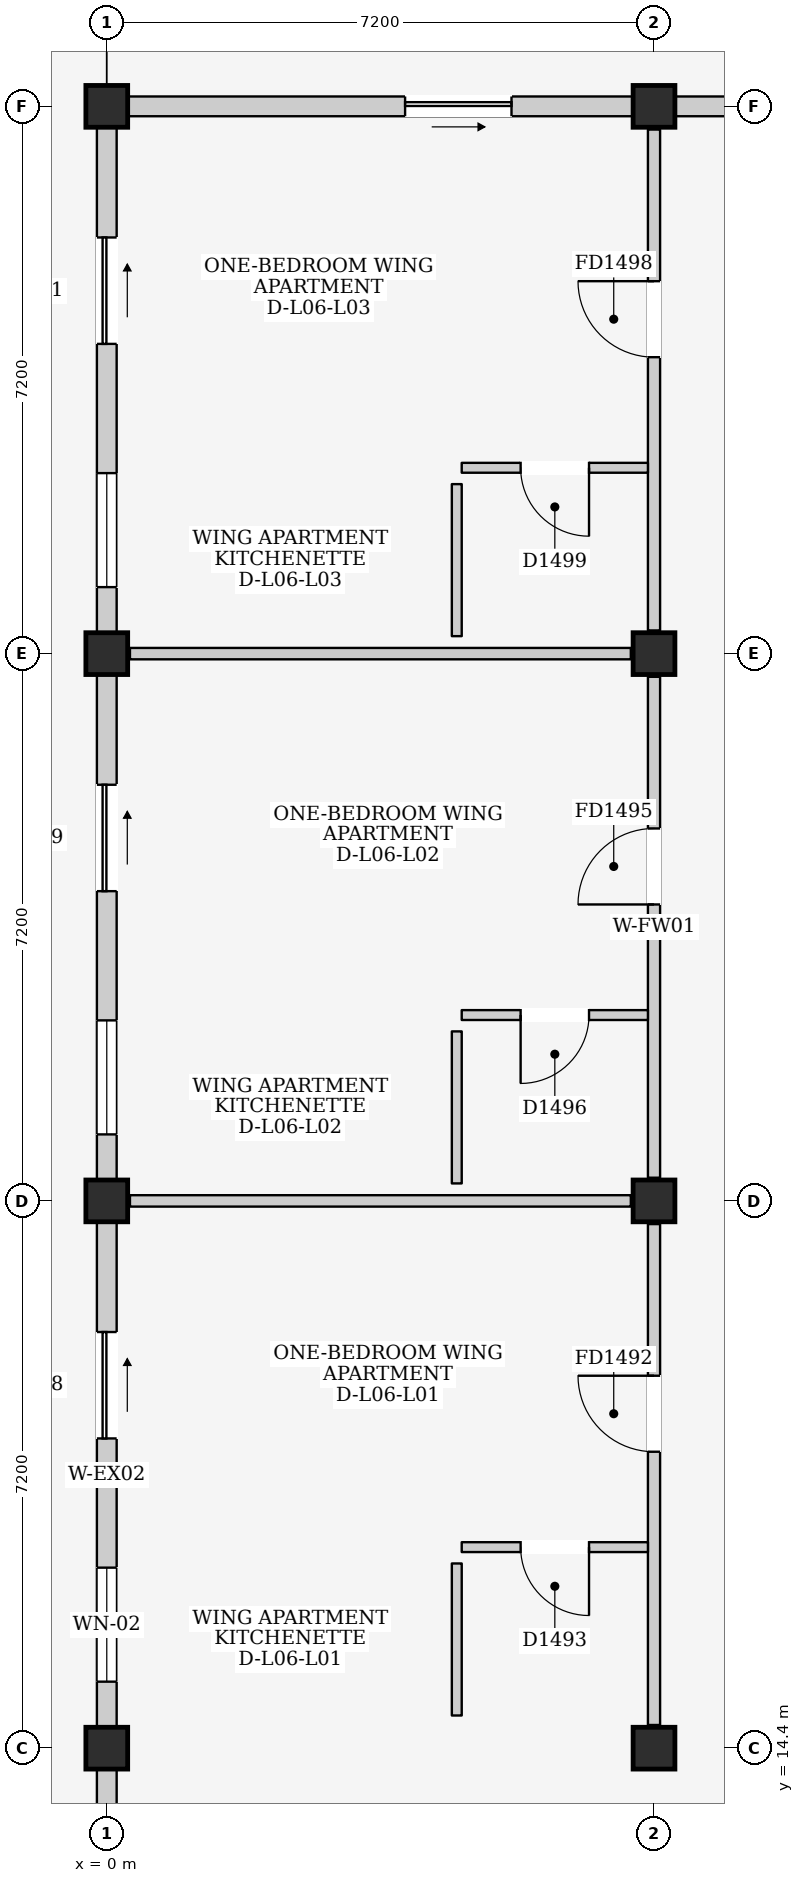
"""IFC4 building model, lengths in metres.
Left out: names, types, materials, properties, quantities, classifications, styles, units other than length and angle.
Written with IfcOpenShell. Run it as: python <this file> out.ifc"""

import sys

from ifc_helpers import new_model, si_unit, direction, frame, frame_2d, origin, origin_2d, place, context, subcontext, project, spatial, rectangle, extrude, element, fill, save


model = new_model("IFC4")
c1 = context("Model", 3, precision=1e-05, world=origin(), true_north=direction((0.0, 1.0)))
c2 = subcontext(c1, "Body", "Model", "MODEL_VIEW")
j1 = project(units=[si_unit("LENGTHUNIT", "METRE"), si_unit("PLANEANGLEUNIT", "RADIAN")], contexts=[c1])
p1 = place(None, origin())
s1 = spatial("IfcSite", under=j1, at=p1, CompositionType="ELEMENT")
p2 = place(p1, origin())
s2 = spatial("IfcBuilding", under=s1, at=p2, CompositionType="ELEMENT")
p3 = place(p2, frame((0.0, 0.0, 21.9)))
s3 = spatial("IfcBuildingStorey", under=s2, at=p3, CompositionType="ELEMENT", Elevation=21.9)
for number, where, z_axis, x_axis in (
    (1, (0.0, 14.4, 0.0), (0.0, 0.0, 1.0), (1.0, 0.0, 0.0)),
    (2, (0.0, 21.6, 0.0), (0.0, 0.0, 1.0), (1.0, 0.0, 0.0)),
    (3, (0.0, 28.8, 0.0), (0.0, 0.0, 1.0), (1.0, 0.0, 0.0)),
    (4, (0.0, 36.0, 0.0), (0.0, 0.0, 1.0), (1.0, 0.0, 0.0)),
    (5, (7.2, 14.4, 0.0), (0.0, 0.0, 1.0), (1.0, 0.0, 0.0)),
    (6, (7.2, 21.6, 0.0), (0.0, 0.0, 1.0), (1.0, 0.0, 0.0)),
    (7, (7.2, 28.8, 0.0), (0.0, 0.0, 1.0), (1.0, 0.0, 0.0)),
    (8, (7.2, 36.0, 0.0), (0.0, 0.0, 1.0), (1.0, 0.0, 0.0)),
):
    element("IfcColumn", number, at=place(p3, frame(where, z_axis=z_axis, x_axis=x_axis)), inside=s3, PredefinedType="COLUMN", context=c2, shape_type="SweptSolid", body=[
        extrude(rectangle(XDim=0.55, YDim=0.55, at=origin_2d()), origin(), (0.0, 0.0, 1.0), 3.2),
    ])
p4 = place(p3, frame((0.0, 7.475, 0.0), z_axis=(0.0, 0.0, 1.0), x_axis=(0.0, 1.0, 0.0)))
e9 = element("IfcWall", 9, at=p4, inside=s3, PredefinedType="ELEMENTEDWALL", context=c2, shape_type="SweptSolid", body=[
    extrude(rectangle(XDim=6.65, YDim=0.26, at=frame_2d((3.325, 0.0))), origin(), (0.0, 0.0, 1.0), 2.515),
])
p5 = place(p4, frame((3.65, 0.0, 0.0)))
e10 = element("IfcOpeningElement", 10, at=p5, cuts=e9, PredefinedType="OPENING", context=c2, shape_type="SweptSolid", body=[
    extrude(rectangle(XDim=1.4, YDim=2.1, at=frame_2d((0.7, 1.05))), frame((0.0, 0.145, 0.0), z_axis=(0.0, -1.0, 0.0), x_axis=(1.0, 0.0, 0.0)), (0.0, 0.0, 1.0), 0.29),
])
p6 = place(p3, frame((0.0, 14.675, 0.0), z_axis=(0.0, 0.0, 1.0), x_axis=(0.0, 1.0, 0.0)))
e11 = element("IfcWall", 11, at=p6, inside=s3, PredefinedType="ELEMENTEDWALL", context=c2, shape_type="SweptSolid", body=[
    extrude(rectangle(XDim=6.65, YDim=0.26, at=frame_2d((3.325, 0.0))), origin(), (0.0, 0.0, 1.0), 2.515),
])
p7 = place(p6, frame((3.8, 0.0, 0.0)))
e12 = element("IfcOpeningElement", 12, at=p7, cuts=e11, PredefinedType="OPENING", context=c2, shape_type="SweptSolid", body=[
    extrude(rectangle(XDim=1.4, YDim=2.1, at=frame_2d((0.7, 1.05))), frame((0.0, 0.145, 0.0), z_axis=(0.0, -1.0, 0.0), x_axis=(1.0, 0.0, 0.0)), (0.0, 0.0, 1.0), 0.29),
])
p8 = place(p6, frame((0.6, 0.0, 0.905)))
e13 = element("IfcOpeningElement", 13, at=p8, cuts=e11, PredefinedType="OPENING", context=c2, shape_type="SweptSolid", body=[
    extrude(rectangle(XDim=1.5, YDim=1.5, at=frame_2d((0.75, 0.75))), frame((0.0, 0.145, 0.0), z_axis=(0.0, -1.0, 0.0), x_axis=(1.0, 0.0, 0.0)), (0.0, 0.0, 1.0), 0.29),
])
p9 = place(p3, frame((0.0, 21.875, 0.0), z_axis=(0.0, 0.0, 1.0), x_axis=(0.0, 1.0, 0.0)))
e14 = element("IfcWall", 14, at=p9, inside=s3, PredefinedType="ELEMENTEDWALL", context=c2, shape_type="SweptSolid", body=[
    extrude(rectangle(XDim=6.65, YDim=0.26, at=frame_2d((3.325, 0.0))), origin(), (0.0, 0.0, 1.0), 2.515),
])
p10 = place(p9, frame((3.8, 0.0, 0.0)))
e15 = element("IfcOpeningElement", 15, at=p10, cuts=e14, PredefinedType="OPENING", context=c2, shape_type="SweptSolid", body=[
    extrude(rectangle(XDim=1.4, YDim=2.1, at=frame_2d((0.7, 1.05))), frame((0.0, 0.145, 0.0), z_axis=(0.0, -1.0, 0.0), x_axis=(1.0, 0.0, 0.0)), (0.0, 0.0, 1.0), 0.29),
])
p11 = place(p9, frame((0.6, 0.0, 0.905)))
e16 = element("IfcOpeningElement", 16, at=p11, cuts=e14, PredefinedType="OPENING", context=c2, shape_type="SweptSolid", body=[
    extrude(rectangle(XDim=1.5, YDim=1.5, at=frame_2d((0.75, 0.75))), frame((0.0, 0.145, 0.0), z_axis=(0.0, -1.0, 0.0), x_axis=(1.0, 0.0, 0.0)), (0.0, 0.0, 1.0), 0.29),
])
p12 = place(p3, frame((0.275, 36.0, 0.0), z_axis=(0.0, 0.0, 1.0), x_axis=(1.0, 0.0, 0.0)))
e17 = element("IfcWall", 17, at=p12, inside=s3, PredefinedType="ELEMENTEDWALL", context=c2, shape_type="SweptSolid", body=[
    extrude(rectangle(XDim=6.65, YDim=0.26, at=frame_2d((3.325, 0.0))), origin(), (0.0, 0.0, 1.0), 2.365),
])
p13 = place(p12, frame((3.65, 0.0, 0.0)))
e18 = element("IfcOpeningElement", 18, at=p13, cuts=e17, PredefinedType="OPENING", context=c2, shape_type="SweptSolid", body=[
    extrude(rectangle(XDim=1.4, YDim=2.1, at=frame_2d((0.7, 1.05))), frame((0.0, 0.145, 0.0), z_axis=(0.0, -1.0, 0.0), x_axis=(1.0, 0.0, 0.0)), (0.0, 0.0, 1.0), 0.29),
])
p14 = place(p3, frame((0.0, 29.075, 0.0), z_axis=(0.0, 0.0, 1.0), x_axis=(0.0, 1.0, 0.0)))
e19 = element("IfcWall", 19, at=p14, inside=s3, PredefinedType="ELEMENTEDWALL", context=c2, shape_type="SweptSolid", body=[
    extrude(rectangle(XDim=6.65, YDim=0.26, at=frame_2d((3.325, 0.0))), origin(), (0.0, 0.0, 1.0), 2.515),
])
p15 = place(p14, frame((3.8, 0.0, 0.0)))
e20 = element("IfcOpeningElement", 20, at=p15, cuts=e19, PredefinedType="OPENING", context=c2, shape_type="SweptSolid", body=[
    extrude(rectangle(XDim=1.4, YDim=2.1, at=frame_2d((0.7, 1.05))), frame((0.0, 0.145, 0.0), z_axis=(0.0, -1.0, 0.0), x_axis=(1.0, 0.0, 0.0)), (0.0, 0.0, 1.0), 0.29),
])
p16 = place(p14, frame((0.6, 0.0, 0.905)))
e21 = element("IfcOpeningElement", 21, at=p16, cuts=e19, PredefinedType="OPENING", context=c2, shape_type="SweptSolid", body=[
    extrude(rectangle(XDim=1.5, YDim=1.5, at=frame_2d((0.75, 0.75))), frame((0.0, 0.145, 0.0), z_axis=(0.0, -1.0, 0.0), x_axis=(1.0, 0.0, 0.0)), (0.0, 0.0, 1.0), 0.29),
])
p17 = place(p3, frame((7.475, 36.0, 0.0), z_axis=(0.0, 0.0, 1.0), x_axis=(1.0, 0.0, 0.0)))
e22 = element("IfcWall", 22, at=p17, inside=s3, PredefinedType="ELEMENTEDWALL", context=c2, shape_type="SweptSolid", body=[
    extrude(rectangle(XDim=6.65, YDim=0.26, at=frame_2d((3.325, 0.0))), origin(), (0.0, 0.0, 1.0), 2.365),
])
p18 = place(p17, frame((2.825, 0.0, 1.1)))
e23 = element("IfcOpeningElement", 23, at=p18, cuts=e22, PredefinedType="OPENING", context=c2, shape_type="SweptSolid", body=[
    extrude(rectangle(XDim=1.0, YDim=0.9, at=frame_2d((0.5, 0.45))), frame((0.0, 0.145, 0.0), z_axis=(0.0, -1.0, 0.0), x_axis=(1.0, 0.0, 0.0)), (0.0, 0.0, 1.0), 0.29),
])
p19 = place(p3, frame((7.2, 14.705, 0.0), z_axis=(0.0, 0.0, 1.0), x_axis=(0.0, 1.0, 0.0)))
e24 = element("IfcWall", 24, at=p19, inside=s3, PredefinedType="PARTITIONING", context=c2, shape_type="SweptSolid", body=[
    extrude(rectangle(XDim=6.59, YDim=0.16, at=frame_2d((3.295, 0.0))), origin(), (0.0, 0.0, 1.0), 2.465),
])
p20 = place(p19, frame((3.595, 0.0, 0.0)))
e25 = element("IfcOpeningElement", 25, at=p20, cuts=e24, PredefinedType="OPENING", context=c2, shape_type="SweptSolid", body=[
    extrude(rectangle(XDim=1.0, YDim=2.15, at=frame_2d((0.5, 1.075))), frame((0.0, 0.095, 0.0), z_axis=(0.0, -1.0, 0.0), x_axis=(1.0, 0.0, 0.0)), (0.0, 0.0, 1.0), 0.19),
])
p21 = place(p3, frame((0.305, 21.6, 0.0), z_axis=(0.0, 0.0, 1.0), x_axis=(1.0, 0.0, 0.0)))
e26 = element("IfcWall", 26, at=p21, inside=s3, PredefinedType="PARTITIONING", context=c2, shape_type="SweptSolid", body=[
    extrude(rectangle(XDim=6.59, YDim=0.15, at=frame_2d((3.295, 0.0))), origin(), (0.0, 0.0, 1.0), 2.365),
])
p22 = place(p3, frame((4.67, 17.045, 0.0), z_axis=(0.0, 0.0, 1.0), x_axis=(1.0, 0.0, 0.0)))
e27 = element("IfcWall", 27, at=p22, inside=s3, PredefinedType="PARTITIONING", context=c2, shape_type="SweptSolid", body=[
    extrude(rectangle(XDim=2.45, YDim=0.13, at=frame_2d((1.225, 0.0))), origin(), (0.0, 0.0, 1.0), 2.98),
])
p23 = place(p22, frame((0.775, 0.0, 0.0)))
e28 = element("IfcOpeningElement", 28, at=p23, cuts=e27, PredefinedType="OPENING", context=c2, shape_type="SweptSolid", body=[
    extrude(rectangle(XDim=0.9, YDim=2.1, at=frame_2d((0.45, 1.05))), frame((0.0, 0.08, 0.0), z_axis=(0.0, -1.0, 0.0), x_axis=(1.0, 0.0, 0.0)), (0.0, 0.0, 1.0), 0.16),
])
p24 = place(p3, frame((4.605, 14.83, 0.0), z_axis=(0.0, 0.0, 1.0), x_axis=(0.0, 1.0, 0.0)))
e29 = element("IfcWall", 29, at=p24, inside=s3, PredefinedType="PARTITIONING", context=c2, shape_type="SweptSolid", body=[
    extrude(rectangle(XDim=2.0, YDim=0.13, at=frame_2d((1.0, 0.0))), origin(), (0.0, 0.0, 1.0), 2.98),
])
p25 = place(p3, frame((7.2, 21.905, 0.0), z_axis=(0.0, 0.0, 1.0), x_axis=(0.0, 1.0, 0.0)))
e30 = element("IfcWall", 30, at=p25, inside=s3, PredefinedType="PARTITIONING", context=c2, shape_type="SweptSolid", body=[
    extrude(rectangle(XDim=6.59, YDim=0.16, at=frame_2d((3.295, 0.0))), origin(), (0.0, 0.0, 1.0), 2.465),
])
p26 = place(p25, frame((3.595, 0.0, 0.0)))
e31 = element("IfcOpeningElement", 31, at=p26, cuts=e30, PredefinedType="OPENING", context=c2, shape_type="SweptSolid", body=[
    extrude(rectangle(XDim=1.0, YDim=2.15, at=frame_2d((0.5, 1.075))), frame((0.0, 0.095, 0.0), z_axis=(0.0, -1.0, 0.0), x_axis=(1.0, 0.0, 0.0)), (0.0, 0.0, 1.0), 0.19),
])
p27 = place(p3, frame((0.305, 28.8, 0.0), z_axis=(0.0, 0.0, 1.0), x_axis=(1.0, 0.0, 0.0)))
e32 = element("IfcWall", 32, at=p27, inside=s3, PredefinedType="PARTITIONING", context=c2, shape_type="SweptSolid", body=[
    extrude(rectangle(XDim=6.59, YDim=0.15, at=frame_2d((3.295, 0.0))), origin(), (0.0, 0.0, 1.0), 2.365),
])
p28 = place(p3, frame((4.67, 24.045, 0.0), z_axis=(0.0, 0.0, 1.0), x_axis=(1.0, 0.0, 0.0)))
e33 = element("IfcWall", 33, at=p28, inside=s3, PredefinedType="PARTITIONING", context=c2, shape_type="SweptSolid", body=[
    extrude(rectangle(XDim=2.45, YDim=0.13, at=frame_2d((1.225, 0.0))), origin(), (0.0, 0.0, 1.0), 2.98),
])
p29 = place(p28, frame((0.775, 0.0, 0.0)))
e34 = element("IfcOpeningElement", 34, at=p29, cuts=e33, PredefinedType="OPENING", context=c2, shape_type="SweptSolid", body=[
    extrude(rectangle(XDim=0.9, YDim=2.1, at=frame_2d((0.45, 1.05))), frame((0.0, 0.08, 0.0), z_axis=(0.0, -1.0, 0.0), x_axis=(1.0, 0.0, 0.0)), (0.0, 0.0, 1.0), 0.16),
])
p30 = place(p3, frame((4.605, 21.83, 0.0), z_axis=(0.0, 0.0, 1.0), x_axis=(0.0, 1.0, 0.0)))
e35 = element("IfcWall", 35, at=p30, inside=s3, PredefinedType="PARTITIONING", context=c2, shape_type="SweptSolid", body=[
    extrude(rectangle(XDim=2.0, YDim=0.13, at=frame_2d((1.0, 0.0))), origin(), (0.0, 0.0, 1.0), 2.98),
])
p31 = place(p3, frame((7.2, 29.105, 0.0), z_axis=(0.0, 0.0, 1.0), x_axis=(0.0, 1.0, 0.0)))
e36 = element("IfcWall", 36, at=p31, inside=s3, PredefinedType="PARTITIONING", context=c2, shape_type="SweptSolid", body=[
    extrude(rectangle(XDim=6.59, YDim=0.16, at=frame_2d((3.295, 0.0))), origin(), (0.0, 0.0, 1.0), 2.465),
])
p32 = place(p31, frame((3.595, 0.0, 0.0)))
e37 = element("IfcOpeningElement", 37, at=p32, cuts=e36, PredefinedType="OPENING", context=c2, shape_type="SweptSolid", body=[
    extrude(rectangle(XDim=1.0, YDim=2.15, at=frame_2d((0.5, 1.075))), frame((0.0, 0.095, 0.0), z_axis=(0.0, -1.0, 0.0), x_axis=(1.0, 0.0, 0.0)), (0.0, 0.0, 1.0), 0.19),
])
p33 = place(p3, frame((4.67, 31.245, 0.0), z_axis=(0.0, 0.0, 1.0), x_axis=(1.0, 0.0, 0.0)))
e38 = element("IfcWall", 38, at=p33, inside=s3, PredefinedType="PARTITIONING", context=c2, shape_type="SweptSolid", body=[
    extrude(rectangle(XDim=2.45, YDim=0.13, at=frame_2d((1.225, 0.0))), origin(), (0.0, 0.0, 1.0), 2.98),
])
p34 = place(p33, frame((0.775, 0.0, 0.0)))
e39 = element("IfcOpeningElement", 39, at=p34, cuts=e38, PredefinedType="OPENING", context=c2, shape_type="SweptSolid", body=[
    extrude(rectangle(XDim=0.9, YDim=2.1, at=frame_2d((0.45, 1.05))), frame((0.0, 0.08, 0.0), z_axis=(0.0, -1.0, 0.0), x_axis=(1.0, 0.0, 0.0)), (0.0, 0.0, 1.0), 0.16),
])
p35 = place(p3, frame((4.605, 29.03, 0.0), z_axis=(0.0, 0.0, 1.0), x_axis=(0.0, 1.0, 0.0)))
e40 = element("IfcWall", 40, at=p35, inside=s3, PredefinedType="PARTITIONING", context=c2, shape_type="SweptSolid", body=[
    extrude(rectangle(XDim=2.0, YDim=0.13, at=frame_2d((1.0, 0.0))), origin(), (0.0, 0.0, 1.0), 2.98),
])
p36 = place(p7, frame((1.4, 0.0, 0.0), z_axis=(0.0, 0.0, 1.0), x_axis=(-1.0, 0.0, 0.0)))
e41 = element("IfcDoor", 41, at=p36, inside=s3, OperationType="SLIDING_TO_RIGHT", PredefinedType="DOOR", context=c2, shape_type="SweptSolid", body=[
    extrude(rectangle(XDim=1.4, YDim=2.1, at=frame_2d((0.7, 1.05))), frame((0.0, 0.025, 0.0), z_axis=(0.0, -1.0, 0.0), x_axis=(1.0, 0.0, 0.0)), (0.0, 0.0, 1.0), 0.05),
])
fill(e12, e41)
p37 = place(p8, origin())
e42 = element("IfcWindow", 42, at=p37, inside=s3, PartitioningType="DOUBLE_PANEL_VERTICAL", PredefinedType="WINDOW", context=c2, shape_type="SweptSolid", body=[
    extrude(rectangle(XDim=1.5, YDim=1.5, at=frame_2d((0.75, 0.75))), frame((0.0, 0.03, 0.0), z_axis=(0.0, -1.0, 0.0), x_axis=(1.0, 0.0, 0.0)), (0.0, 0.0, 1.0), 0.06),
])
fill(e13, e42)
p38 = place(p10, frame((1.4, 0.0, 0.0), z_axis=(0.0, 0.0, 1.0), x_axis=(-1.0, 0.0, 0.0)))
e43 = element("IfcDoor", 43, at=p38, inside=s3, OperationType="SLIDING_TO_RIGHT", PredefinedType="DOOR", context=c2, shape_type="SweptSolid", body=[
    extrude(rectangle(XDim=1.4, YDim=2.1, at=frame_2d((0.7, 1.05))), frame((0.0, 0.025, 0.0), z_axis=(0.0, -1.0, 0.0), x_axis=(1.0, 0.0, 0.0)), (0.0, 0.0, 1.0), 0.05),
])
fill(e15, e43)
p39 = place(p11, origin())
e44 = element("IfcWindow", 44, at=p39, inside=s3, PartitioningType="DOUBLE_PANEL_VERTICAL", PredefinedType="WINDOW", context=c2, shape_type="SweptSolid", body=[
    extrude(rectangle(XDim=1.5, YDim=1.5, at=frame_2d((0.75, 0.75))), frame((0.0, 0.03, 0.0), z_axis=(0.0, -1.0, 0.0), x_axis=(1.0, 0.0, 0.0)), (0.0, 0.0, 1.0), 0.06),
])
fill(e16, e44)
p40 = place(p13, frame((1.4, 0.0, 0.0), z_axis=(0.0, 0.0, 1.0), x_axis=(-1.0, 0.0, 0.0)))
e45 = element("IfcDoor", 45, at=p40, inside=s3, OperationType="SLIDING_TO_RIGHT", PredefinedType="DOOR", context=c2, shape_type="SweptSolid", body=[
    extrude(rectangle(XDim=1.4, YDim=2.1, at=frame_2d((0.7, 1.05))), frame((0.0, 0.025, 0.0), z_axis=(0.0, -1.0, 0.0), x_axis=(1.0, 0.0, 0.0)), (0.0, 0.0, 1.0), 0.05),
])
fill(e18, e45)
p41 = place(p15, frame((1.4, 0.0, 0.0), z_axis=(0.0, 0.0, 1.0), x_axis=(-1.0, 0.0, 0.0)))
e46 = element("IfcDoor", 46, at=p41, inside=s3, OperationType="SLIDING_TO_RIGHT", PredefinedType="DOOR", context=c2, shape_type="SweptSolid", body=[
    extrude(rectangle(XDim=1.4, YDim=2.1, at=frame_2d((0.7, 1.05))), frame((0.0, 0.025, 0.0), z_axis=(0.0, -1.0, 0.0), x_axis=(1.0, 0.0, 0.0)), (0.0, 0.0, 1.0), 0.05),
])
fill(e20, e46)
p42 = place(p16, origin())
e47 = element("IfcWindow", 47, at=p42, inside=s3, PartitioningType="DOUBLE_PANEL_VERTICAL", PredefinedType="WINDOW", context=c2, shape_type="SweptSolid", body=[
    extrude(rectangle(XDim=1.5, YDim=1.5, at=frame_2d((0.75, 0.75))), frame((0.0, 0.03, 0.0), z_axis=(0.0, -1.0, 0.0), x_axis=(1.0, 0.0, 0.0)), (0.0, 0.0, 1.0), 0.06),
])
fill(e21, e47)
p43 = place(p20, origin())
e48 = element("IfcDoor", 48, at=p43, inside=s3, OperationType="SINGLE_SWING_RIGHT", PredefinedType="DOOR", context=c2, shape_type="SweptSolid", body=[
    extrude(rectangle(XDim=1.0, YDim=2.15, at=frame_2d((0.5, 1.075))), frame((0.0, 0.025, 0.0), z_axis=(0.0, -1.0, 0.0), x_axis=(1.0, 0.0, 0.0)), (0.0, 0.0, 1.0), 0.05),
])
fill(e25, e48)
p44 = place(p23, frame((0.9, 0.0, 0.0), z_axis=(0.0, 0.0, 1.0), x_axis=(-1.0, 0.0, 0.0)))
e49 = element("IfcDoor", 49, at=p44, inside=s3, OperationType="SINGLE_SWING_LEFT", PredefinedType="DOOR", context=c2, shape_type="SweptSolid", body=[
    extrude(rectangle(XDim=0.9, YDim=2.1, at=frame_2d((0.45, 1.05))), frame((0.0, 0.025, 0.0), z_axis=(0.0, -1.0, 0.0), x_axis=(1.0, 0.0, 0.0)), (0.0, 0.0, 1.0), 0.05),
])
fill(e28, e49)
p45 = place(p26, origin())
e50 = element("IfcDoor", 50, at=p45, inside=s3, OperationType="SINGLE_SWING_LEFT", PredefinedType="DOOR", context=c2, shape_type="SweptSolid", body=[
    extrude(rectangle(XDim=1.0, YDim=2.15, at=frame_2d((0.5, 1.075))), frame((0.0, 0.025, 0.0), z_axis=(0.0, -1.0, 0.0), x_axis=(1.0, 0.0, 0.0)), (0.0, 0.0, 1.0), 0.05),
])
fill(e31, e50)
p46 = place(p29, frame((0.9, 0.0, 0.0), z_axis=(0.0, 0.0, 1.0), x_axis=(-1.0, 0.0, 0.0)))
e51 = element("IfcDoor", 51, at=p46, inside=s3, OperationType="SINGLE_SWING_RIGHT", PredefinedType="DOOR", context=c2, shape_type="SweptSolid", body=[
    extrude(rectangle(XDim=0.9, YDim=2.1, at=frame_2d((0.45, 1.05))), frame((0.0, 0.025, 0.0), z_axis=(0.0, -1.0, 0.0), x_axis=(1.0, 0.0, 0.0)), (0.0, 0.0, 1.0), 0.05),
])
fill(e34, e51)
p47 = place(p32, origin())
e52 = element("IfcDoor", 52, at=p47, inside=s3, OperationType="SINGLE_SWING_RIGHT", PredefinedType="DOOR", context=c2, shape_type="SweptSolid", body=[
    extrude(rectangle(XDim=1.0, YDim=2.15, at=frame_2d((0.5, 1.075))), frame((0.0, 0.025, 0.0), z_axis=(0.0, -1.0, 0.0), x_axis=(1.0, 0.0, 0.0)), (0.0, 0.0, 1.0), 0.05),
])
fill(e37, e52)
p48 = place(p34, frame((0.9, 0.0, 0.0), z_axis=(0.0, 0.0, 1.0), x_axis=(-1.0, 0.0, 0.0)))
e53 = element("IfcDoor", 53, at=p48, inside=s3, OperationType="SINGLE_SWING_LEFT", PredefinedType="DOOR", context=c2, shape_type="SweptSolid", body=[
    extrude(rectangle(XDim=0.9, YDim=2.1, at=frame_2d((0.45, 1.05))), frame((0.0, 0.025, 0.0), z_axis=(0.0, -1.0, 0.0), x_axis=(1.0, 0.0, 0.0)), (0.0, 0.0, 1.0), 0.05),
])
fill(e39, e53)
save(model, sys.argv[1])
